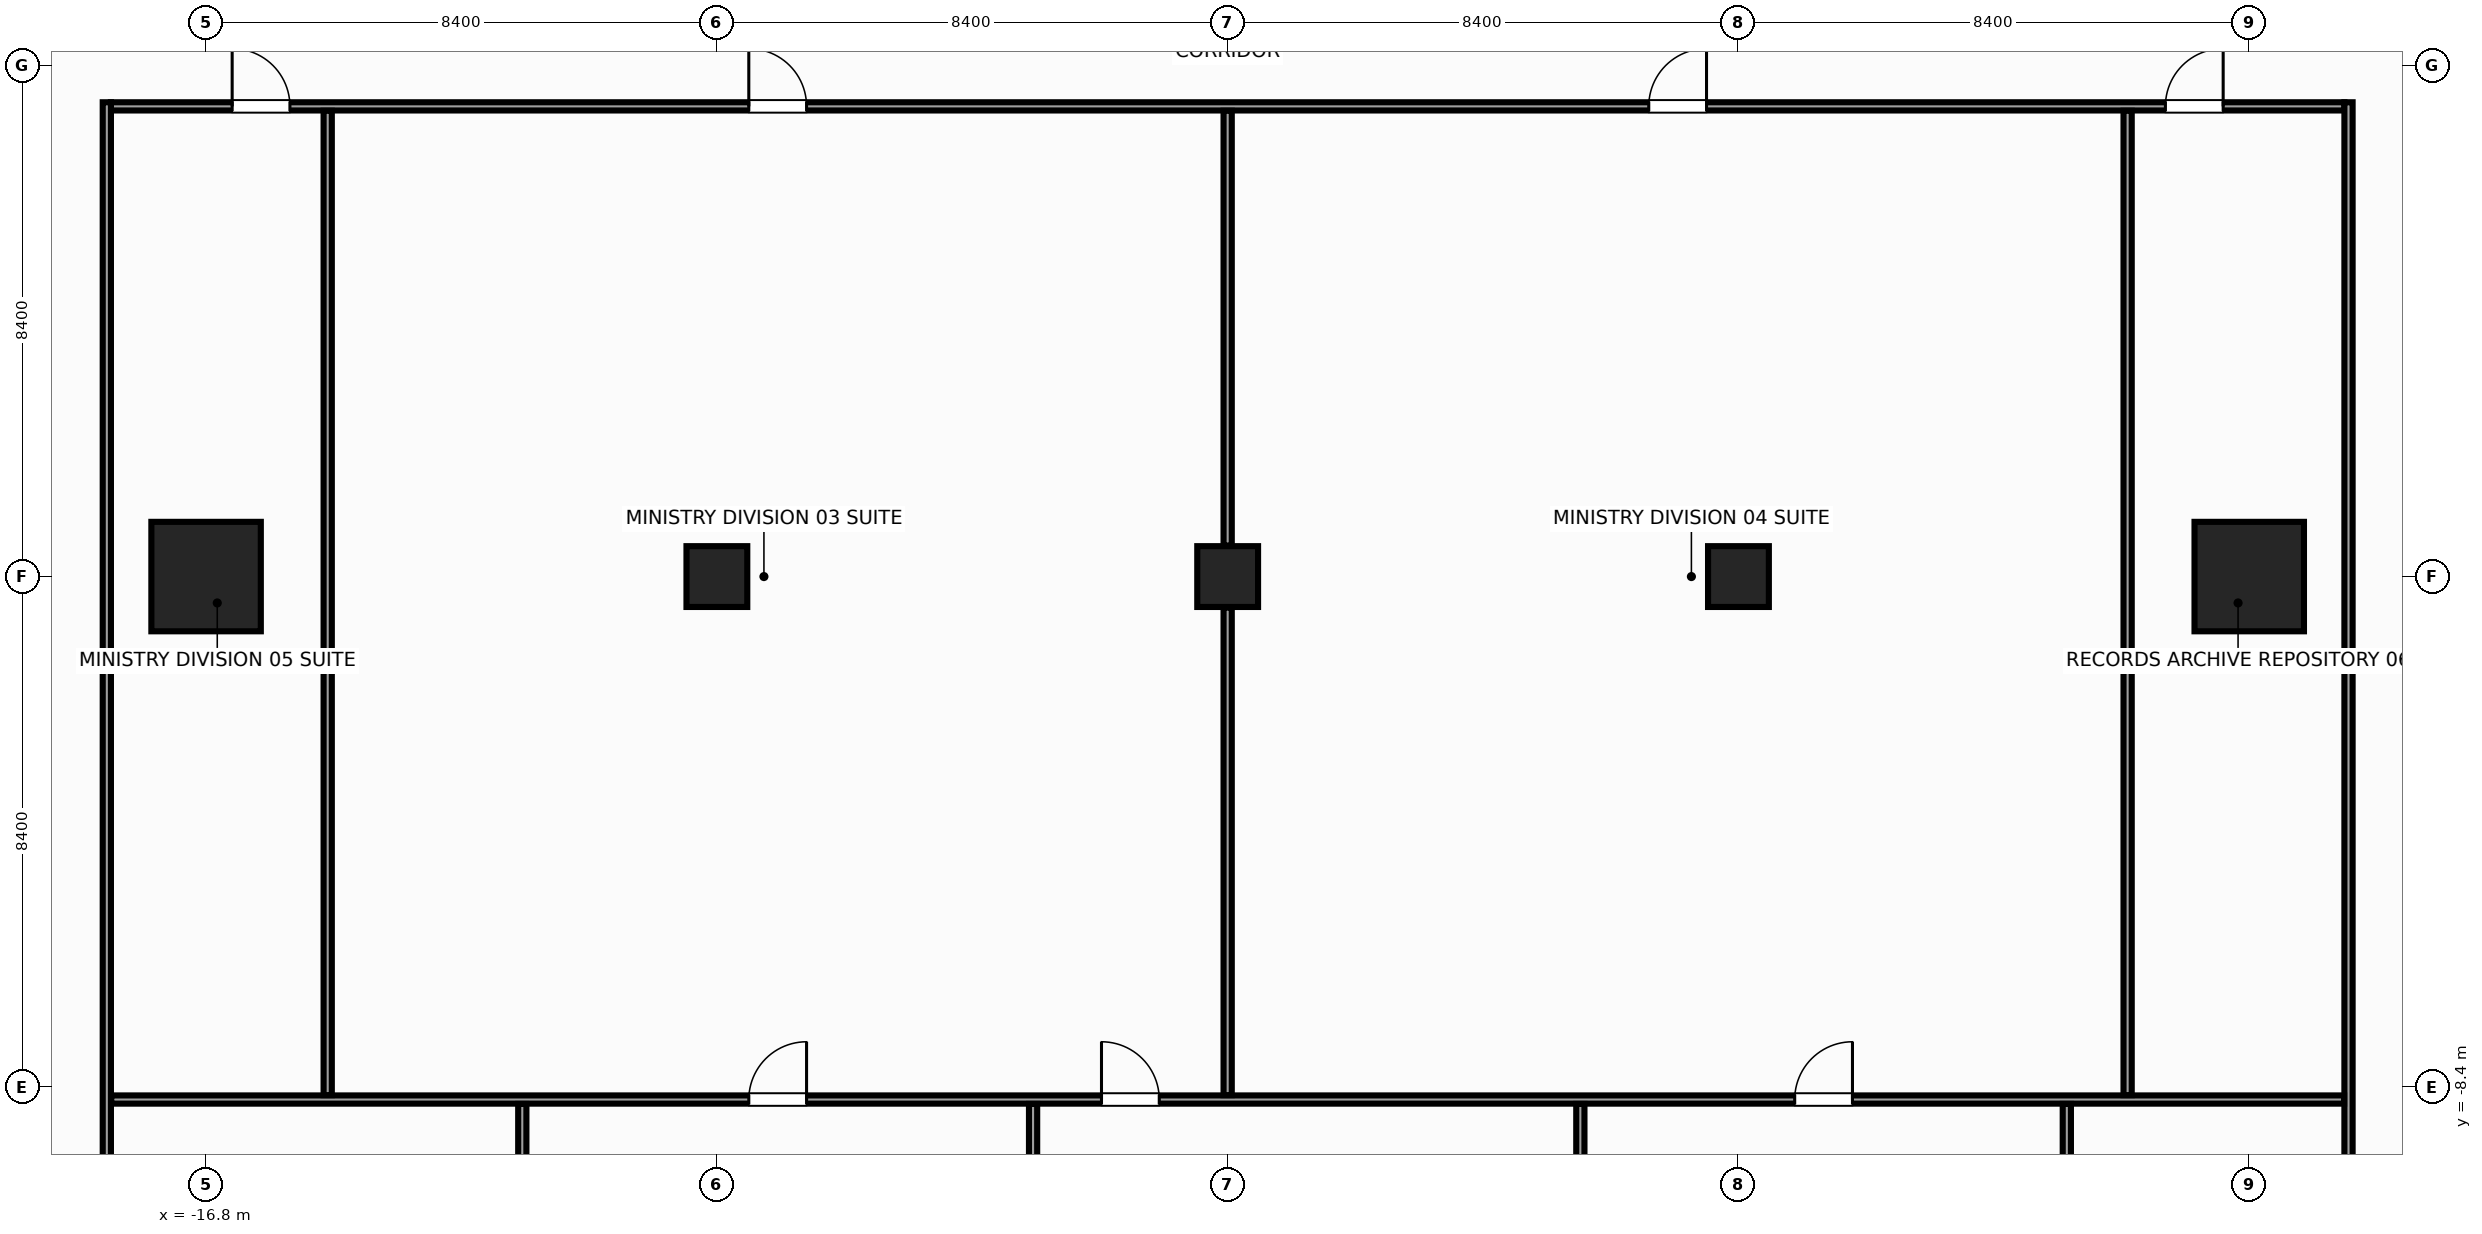
"""IFC4 building model, lengths in metres.
Left out: names, types, materials, properties, quantities, classifications, styles, units other than length and angle.
Written with IfcOpenShell. Run it as: python <this file> out.ifc"""

import sys

from ifc_helpers import new_model, si_unit, direction, frame, frame_2d, origin, origin_with_axes, origin_2d, place, context, subcontext, project, spatial, rectangle, hollow_rectangle, extrude, source, transform, mapped, element, fill, save


model = new_model("IFC4")
c1 = context("Model", 3, precision=1e-05, world=origin(), true_north=direction((0.0, 1.0)))
c2 = subcontext(c1, "Body", "Model", "MODEL_VIEW")
j1 = project(units=[si_unit("LENGTHUNIT", "METRE"), si_unit("PLANEANGLEUNIT", "RADIAN")], contexts=[c1])
p1 = place(None, origin())
s1 = spatial("IfcSite", under=j1, at=p1, CompositionType="ELEMENT")
p2 = place(p1, origin())
s2 = spatial("IfcBuilding", under=s1, at=p2, CompositionType="ELEMENT")
p3 = place(p2, frame((0.0, 0.0, 41.6)))
s3 = spatial("IfcBuildingStorey", under=s2, at=p3, CompositionType="ELEMENT", Elevation=41.6)
m1 = source(origin(), c2, "Body", "SweptSolid", [
    extrude(rectangle(XDim=1.8, YDim=1.8, at=origin_2d()), origin(), (0.0, 0.0, 1.0), 3.6),
])
for number, where, z_axis, x_axis in (
    (1, (-16.8, 0.0, 0.0), (0.0, 0.0, 1.0), (1.0, 0.0, 0.0)),
    (2, (16.8, 0.0, 0.0), (0.0, 0.0, 1.0), (1.0, 0.0, 0.0)),
):
    element("IfcColumn", number, at=place(p3, frame(where, z_axis=z_axis, x_axis=x_axis)), inside=s3, PredefinedType="COLUMN", context=c2, shape_type="MappedRepresentation", body=[
        mapped(m1, transform((0.0, 0.0, 0.0), x_axis=(1.0, 0.0, 0.0), y_axis=(0.0, 1.0, 0.0), z_axis=(0.0, 0.0, 1.0), scale=1.0)),
    ])
m2 = source(origin(), c2, "Body", "SweptSolid", [
    extrude(hollow_rectangle(XDim=1.0, YDim=1.0, WallThickness=0.045, at=origin_2d()), origin(), (0.0, 0.0, 1.0), 3.6),
])
for number, where, z_axis, x_axis in (
    (3, (-8.4, 0.0, 0.0), (0.0, 0.0, 1.0), (1.0, 0.0, 0.0)),
    (4, (8.4, 0.0, 0.0), (0.0, 0.0, 1.0), (1.0, 0.0, 0.0)),
):
    element("IfcColumn", number, at=place(p3, frame(where, z_axis=z_axis, x_axis=x_axis)), inside=s3, PredefinedType="COLUMN", context=c2, shape_type="MappedRepresentation", body=[
        mapped(m2, transform((0.0, 0.0, 0.0), x_axis=(1.0, 0.0, 0.0), y_axis=(0.0, 1.0, 0.0), z_axis=(0.0, 0.0, 1.0), scale=1.0)),
    ])
m3 = source(origin(), c2, "Body", "SweptSolid", [
    extrude(rectangle(XDim=1.0, YDim=1.0, at=origin_2d()), origin(), (0.0, 0.0, 1.0), 3.6),
])
p4 = place(p3, origin_with_axes())
e5 = element("IfcColumn", 5, at=p4, inside=s3, PredefinedType="COLUMN", context=c2, shape_type="MappedRepresentation", body=[
    mapped(m3, transform((0.0, 0.0, 0.0), x_axis=(1.0, 0.0, 0.0), y_axis=(0.0, 1.0, 0.0), z_axis=(0.0, 0.0, 1.0), scale=1.0)),
])
m4 = source(origin(), c2, "Body", "SweptSolid", [
    extrude(rectangle(XDim=36.73, YDim=0.135, at=frame_2d((18.365, 0.0))), origin(), (0.0, 0.0, 1.0), 2.745),
])
p5 = place(p3, frame((-18.365, 7.732, 0.0), z_axis=(0.0, 0.0, 1.0), x_axis=(1.0, 0.0, 0.0)))
e6 = element("IfcWall", 6, at=p5, inside=s3, PredefinedType="PARTITIONING", context=c2, shape_type="MappedRepresentation", body=[
    mapped(m4, transform((0.0, 0.0, 0.0), x_axis=(1.0, 0.0, 0.0), y_axis=(0.0, 1.0, 0.0), z_axis=(0.0, 0.0, 1.0), scale=1.0)),
])
p6 = place(p5, frame((10.49, 0.0, 0.0)))
e7 = element("IfcOpeningElement", 7, at=p6, cuts=e6, PredefinedType="OPENING", context=c2, shape_type="SweptSolid", body=[
    extrude(rectangle(XDim=0.95, YDim=2.15, at=frame_2d((0.475, 1.075))), frame((0.0, 0.08, 0.0), z_axis=(0.0, -1.0, 0.0), x_axis=(1.0, 0.0, 0.0)), (0.0, 0.0, 1.0), 0.159),
])
p7 = place(p5, frame((25.29, 0.0, 0.0)))
e8 = element("IfcOpeningElement", 8, at=p7, cuts=e6, PredefinedType="OPENING", context=c2, shape_type="SweptSolid", body=[
    extrude(rectangle(XDim=0.95, YDim=2.15, at=frame_2d((0.475, 1.075))), frame((0.0, 0.08, 0.0), z_axis=(0.0, -1.0, 0.0), x_axis=(1.0, 0.0, 0.0)), (0.0, 0.0, 1.0), 0.159),
])
p8 = place(p5, frame((1.994, 0.0, 0.0)))
e9 = element("IfcOpeningElement", 9, at=p8, cuts=e6, PredefinedType="OPENING", context=c2, shape_type="SweptSolid", body=[
    extrude(rectangle(XDim=0.95, YDim=2.15, at=frame_2d((0.475, 1.075))), frame((0.0, 0.08, 0.0), z_axis=(0.0, -1.0, 0.0), x_axis=(1.0, 0.0, 0.0)), (0.0, 0.0, 1.0), 0.159),
])
p9 = place(p5, frame((33.786, 0.0, 0.0)))
e10 = element("IfcOpeningElement", 10, at=p9, cuts=e6, PredefinedType="OPENING", context=c2, shape_type="SweptSolid", body=[
    extrude(rectangle(XDim=0.95, YDim=2.15, at=frame_2d((0.475, 1.075))), frame((0.0, 0.08, 0.0), z_axis=(0.0, -1.0, 0.0), x_axis=(1.0, 0.0, 0.0)), (0.0, 0.0, 1.0), 0.159),
])
m5 = source(origin(), c2, "Body", "SweptSolid", [
    extrude(rectangle(XDim=21.995, YDim=0.135, at=frame_2d((10.998, 0.0))), origin(), (0.0, 0.0, 1.0), 2.745),
])
p10 = place(p3, frame((-18.433, -14.195, 0.0), z_axis=(0.0, 0.0, 1.0), x_axis=(0.0, 1.0, 0.0)))
e11 = element("IfcWall", 11, at=p10, inside=s3, PredefinedType="PARTITIONING", context=c2, shape_type="MappedRepresentation", body=[
    mapped(m5, transform((0.0, 0.0, 0.0), x_axis=(1.0, 0.0, 0.0), y_axis=(0.0, 1.0, 0.0), z_axis=(0.0, 0.0, 1.0), scale=1.0)),
])
p11 = place(p10, frame((0.809, 0.0, 0.0)))
e12 = element("IfcOpeningElement", 12, at=p11, cuts=e11, PredefinedType="OPENING", context=c2, shape_type="SweptSolid", body=[
    extrude(rectangle(XDim=0.95, YDim=2.15, at=frame_2d((0.475, 1.075))), frame((0.0, 0.08, 0.0), z_axis=(0.0, -1.0, 0.0), x_axis=(1.0, 0.0, 0.0)), (0.0, 0.0, 1.0), 0.159),
])
p12 = place(p3, frame((18.433, -14.195, 0.0), z_axis=(0.0, 0.0, 1.0), x_axis=(0.0, 1.0, 0.0)))
e13 = element("IfcWall", 13, at=p12, inside=s3, PredefinedType="PARTITIONING", context=c2, shape_type="MappedRepresentation", body=[
    mapped(m5, transform((0.0, 0.0, 0.0), x_axis=(1.0, 0.0, 0.0), y_axis=(0.0, 1.0, 0.0), z_axis=(0.0, 0.0, 1.0), scale=1.0)),
])
p13 = place(p12, frame((0.809, 0.0, 0.0)))
e14 = element("IfcOpeningElement", 14, at=p13, cuts=e13, PredefinedType="OPENING", context=c2, shape_type="SweptSolid", body=[
    extrude(rectangle(XDim=0.95, YDim=2.15, at=frame_2d((0.475, 1.075))), frame((0.0, 0.08, 0.0), z_axis=(0.0, -1.0, 0.0), x_axis=(1.0, 0.0, 0.0)), (0.0, 0.0, 1.0), 0.159),
])
m6 = source(origin(), c2, "Body", "SweptSolid", [
    extrude(rectangle(XDim=36.72, YDim=0.135, at=frame_2d((18.36, 0.0))), origin(), (0.0, 0.0, 1.0), 2.745),
])
p14 = place(p3, frame((-18.36, -8.6, 0.0), z_axis=(0.0, 0.0, 1.0), x_axis=(1.0, 0.0, 0.0)))
e15 = element("IfcWall", 15, at=p14, inside=s3, PredefinedType="PARTITIONING", context=c2, shape_type="MappedRepresentation", body=[
    mapped(m6, transform((0.0, 0.0, 0.0), x_axis=(1.0, 0.0, 0.0), y_axis=(0.0, 1.0, 0.0), z_axis=(0.0, 0.0, 1.0), scale=1.0)),
])
p15 = place(p14, frame((10.485, 0.0, 0.0)))
e16 = element("IfcOpeningElement", 16, at=p15, cuts=e15, PredefinedType="OPENING", context=c2, shape_type="SweptSolid", body=[
    extrude(rectangle(XDim=0.95, YDim=2.15, at=frame_2d((0.475, 1.075))), frame((0.0, 0.08, 0.0), z_axis=(0.0, -1.0, 0.0), x_axis=(1.0, 0.0, 0.0)), (0.0, 0.0, 1.0), 0.159),
])
p16 = place(p14, frame((16.285, 0.0, 0.0)))
e17 = element("IfcOpeningElement", 17, at=p16, cuts=e15, PredefinedType="OPENING", context=c2, shape_type="SweptSolid", body=[
    extrude(rectangle(XDim=0.95, YDim=2.15, at=frame_2d((0.475, 1.075))), frame((0.0, 0.08, 0.0), z_axis=(0.0, -1.0, 0.0), x_axis=(1.0, 0.0, 0.0)), (0.0, 0.0, 1.0), 0.159),
])
p17 = place(p14, frame((27.685, 0.0, 0.0)))
e18 = element("IfcOpeningElement", 18, at=p17, cuts=e15, PredefinedType="OPENING", context=c2, shape_type="SweptSolid", body=[
    extrude(rectangle(XDim=0.95, YDim=2.15, at=frame_2d((0.475, 1.075))), frame((0.0, 0.08, 0.0), z_axis=(0.0, -1.0, 0.0), x_axis=(1.0, 0.0, 0.0)), (0.0, 0.0, 1.0), 0.159),
])
m7 = source(origin(), c2, "Body", "SweptSolid", [
    extrude(rectangle(XDim=16.188, YDim=0.135, at=frame_2d((8.094, 0.0))), origin(), (0.0, 0.0, 1.0), 2.37),
])
p18 = place(p3, frame((-14.8, -8.528, 0.0), z_axis=(0.0, 0.0, 1.0), x_axis=(0.0, 1.0, 0.0)))
e19 = element("IfcWall", 19, at=p18, inside=s3, PredefinedType="PARTITIONING", context=c2, shape_type="MappedRepresentation", body=[
    mapped(m7, transform((0.0, 0.0, 0.0), x_axis=(1.0, 0.0, 0.0), y_axis=(0.0, 1.0, 0.0), z_axis=(0.0, 0.0, 1.0), scale=1.0)),
])
m8 = source(origin(), c2, "Body", "SweptSolid", [
    extrude(rectangle(XDim=8.018, YDim=0.135, at=frame_2d((4.009, 0.0))), origin(), (0.0, 0.0, 1.0), 2.745),
])
p19 = place(p3, frame((0.0, -8.528, 0.0), z_axis=(0.0, 0.0, 1.0), x_axis=(0.0, 1.0, 0.0)))
e20 = element("IfcWall", 20, at=p19, inside=s3, PredefinedType="PARTITIONING", context=c2, shape_type="MappedRepresentation", body=[
    mapped(m8, transform((0.0, 0.0, 0.0), x_axis=(1.0, 0.0, 0.0), y_axis=(0.0, 1.0, 0.0), z_axis=(0.0, 0.0, 1.0), scale=1.0)),
])
m9 = source(origin(), c2, "Body", "SweptSolid", [
    extrude(rectangle(XDim=7.15, YDim=0.135, at=frame_2d((3.575, 0.0))), origin(), (0.0, 0.0, 1.0), 2.37),
])
p20 = place(p3, frame((0.0, 0.51, 0.0), z_axis=(0.0, 0.0, 1.0), x_axis=(0.0, 1.0, 0.0)))
e21 = element("IfcWall", 21, at=p20, inside=s3, PredefinedType="PARTITIONING", context=c2, shape_type="MappedRepresentation", body=[
    mapped(m9, transform((0.0, 0.0, 0.0), x_axis=(1.0, 0.0, 0.0), y_axis=(0.0, 1.0, 0.0), z_axis=(0.0, 0.0, 1.0), scale=1.0)),
])
p21 = place(p3, frame((14.8, -8.528, 0.0), z_axis=(0.0, 0.0, 1.0), x_axis=(0.0, 1.0, 0.0)))
e22 = element("IfcWall", 22, at=p21, inside=s3, PredefinedType="PARTITIONING", context=c2, shape_type="MappedRepresentation", body=[
    mapped(m7, transform((0.0, 0.0, 0.0), x_axis=(1.0, 0.0, 0.0), y_axis=(0.0, 1.0, 0.0), z_axis=(0.0, 0.0, 1.0), scale=1.0)),
])
m10 = source(origin(), c2, "Body", "SweptSolid", [
    extrude(rectangle(XDim=18.177, YDim=0.135, at=frame_2d((9.089, 0.0))), origin(), (0.0, 0.0, 1.0), 2.745),
])
for number, where, z_axis, x_axis in (
    (23, (-11.6, -26.85, 0.0), (0.0, 0.0, 1.0), (0.0, 1.0, 0.0)),
    (24, (-3.2, -26.85, 0.0), (0.0, 0.0, 1.0), (0.0, 1.0, 0.0)),
    (25, (5.8, -26.85, 0.0), (0.0, 0.0, 1.0), (0.0, 1.0, 0.0)),
    (26, (13.8, -26.85, 0.0), (0.0, 0.0, 1.0), (0.0, 1.0, 0.0)),
):
    element("IfcWall", number, at=place(p3, frame(where, z_axis=z_axis, x_axis=x_axis)), inside=s3, PredefinedType="PARTITIONING", context=c2, shape_type="MappedRepresentation", body=[
        mapped(m10, transform((0.0, 0.0, 0.0), x_axis=(1.0, 0.0, 0.0), y_axis=(0.0, 1.0, 0.0), z_axis=(0.0, 0.0, 1.0), scale=1.0)),
    ])
m11 = source(origin(), c2, "Body", "SweptSolid", [
    extrude(rectangle(XDim=0.95, YDim=2.15, at=frame_2d((0.475, 1.075))), frame((0.0, 0.025, 0.0), z_axis=(0.0, -1.0, 0.0), x_axis=(1.0, 0.0, 0.0)), (0.0, 0.0, 1.0), 0.05),
])
p22 = place(p6, origin())
e27 = element("IfcDoor", 27, at=p22, inside=s3, OperationType="SINGLE_SWING_LEFT", PredefinedType="DOOR", context=c2, shape_type="MappedRepresentation", body=[
    mapped(m11, transform((0.0, 0.0, 0.0), x_axis=(1.0, 0.0, 0.0), y_axis=(0.0, 1.0, 0.0), z_axis=(0.0, 0.0, 1.0), scale=1.0)),
])
fill(e7, e27)
p23 = place(p7, origin())
e28 = element("IfcDoor", 28, at=p23, inside=s3, OperationType="SINGLE_SWING_RIGHT", PredefinedType="DOOR", context=c2, shape_type="MappedRepresentation", body=[
    mapped(m11, transform((0.0, 0.0, 0.0), x_axis=(1.0, 0.0, 0.0), y_axis=(0.0, 1.0, 0.0), z_axis=(0.0, 0.0, 1.0), scale=1.0)),
])
fill(e8, e28)
p24 = place(p8, origin())
e29 = element("IfcDoor", 29, at=p24, inside=s3, OperationType="SINGLE_SWING_LEFT", PredefinedType="DOOR", context=c2, shape_type="MappedRepresentation", body=[
    mapped(m11, transform((0.0, 0.0, 0.0), x_axis=(1.0, 0.0, 0.0), y_axis=(0.0, 1.0, 0.0), z_axis=(0.0, 0.0, 1.0), scale=1.0)),
])
fill(e9, e29)
p25 = place(p9, origin())
e30 = element("IfcDoor", 30, at=p25, inside=s3, OperationType="SINGLE_SWING_RIGHT", PredefinedType="DOOR", context=c2, shape_type="MappedRepresentation", body=[
    mapped(m11, transform((0.0, 0.0, 0.0), x_axis=(1.0, 0.0, 0.0), y_axis=(0.0, 1.0, 0.0), z_axis=(0.0, 0.0, 1.0), scale=1.0)),
])
fill(e10, e30)
p26 = place(p15, origin())
e31 = element("IfcDoor", 31, at=p26, inside=s3, OperationType="SINGLE_SWING_RIGHT", PredefinedType="DOOR", context=c2, shape_type="MappedRepresentation", body=[
    mapped(m11, transform((0.0, 0.0, 0.0), x_axis=(1.0, 0.0, 0.0), y_axis=(0.0, 1.0, 0.0), z_axis=(0.0, 0.0, 1.0), scale=1.0)),
])
fill(e16, e31)
p27 = place(p16, origin())
e32 = element("IfcDoor", 32, at=p27, inside=s3, OperationType="SINGLE_SWING_LEFT", PredefinedType="DOOR", context=c2, shape_type="MappedRepresentation", body=[
    mapped(m11, transform((0.0, 0.0, 0.0), x_axis=(1.0, 0.0, 0.0), y_axis=(0.0, 1.0, 0.0), z_axis=(0.0, 0.0, 1.0), scale=1.0)),
])
fill(e17, e32)
p28 = place(p17, origin())
e33 = element("IfcDoor", 33, at=p28, inside=s3, OperationType="SINGLE_SWING_RIGHT", PredefinedType="DOOR", context=c2, shape_type="MappedRepresentation", body=[
    mapped(m11, transform((0.0, 0.0, 0.0), x_axis=(1.0, 0.0, 0.0), y_axis=(0.0, 1.0, 0.0), z_axis=(0.0, 0.0, 1.0), scale=1.0)),
])
fill(e18, e33)
save(model, sys.argv[1])
